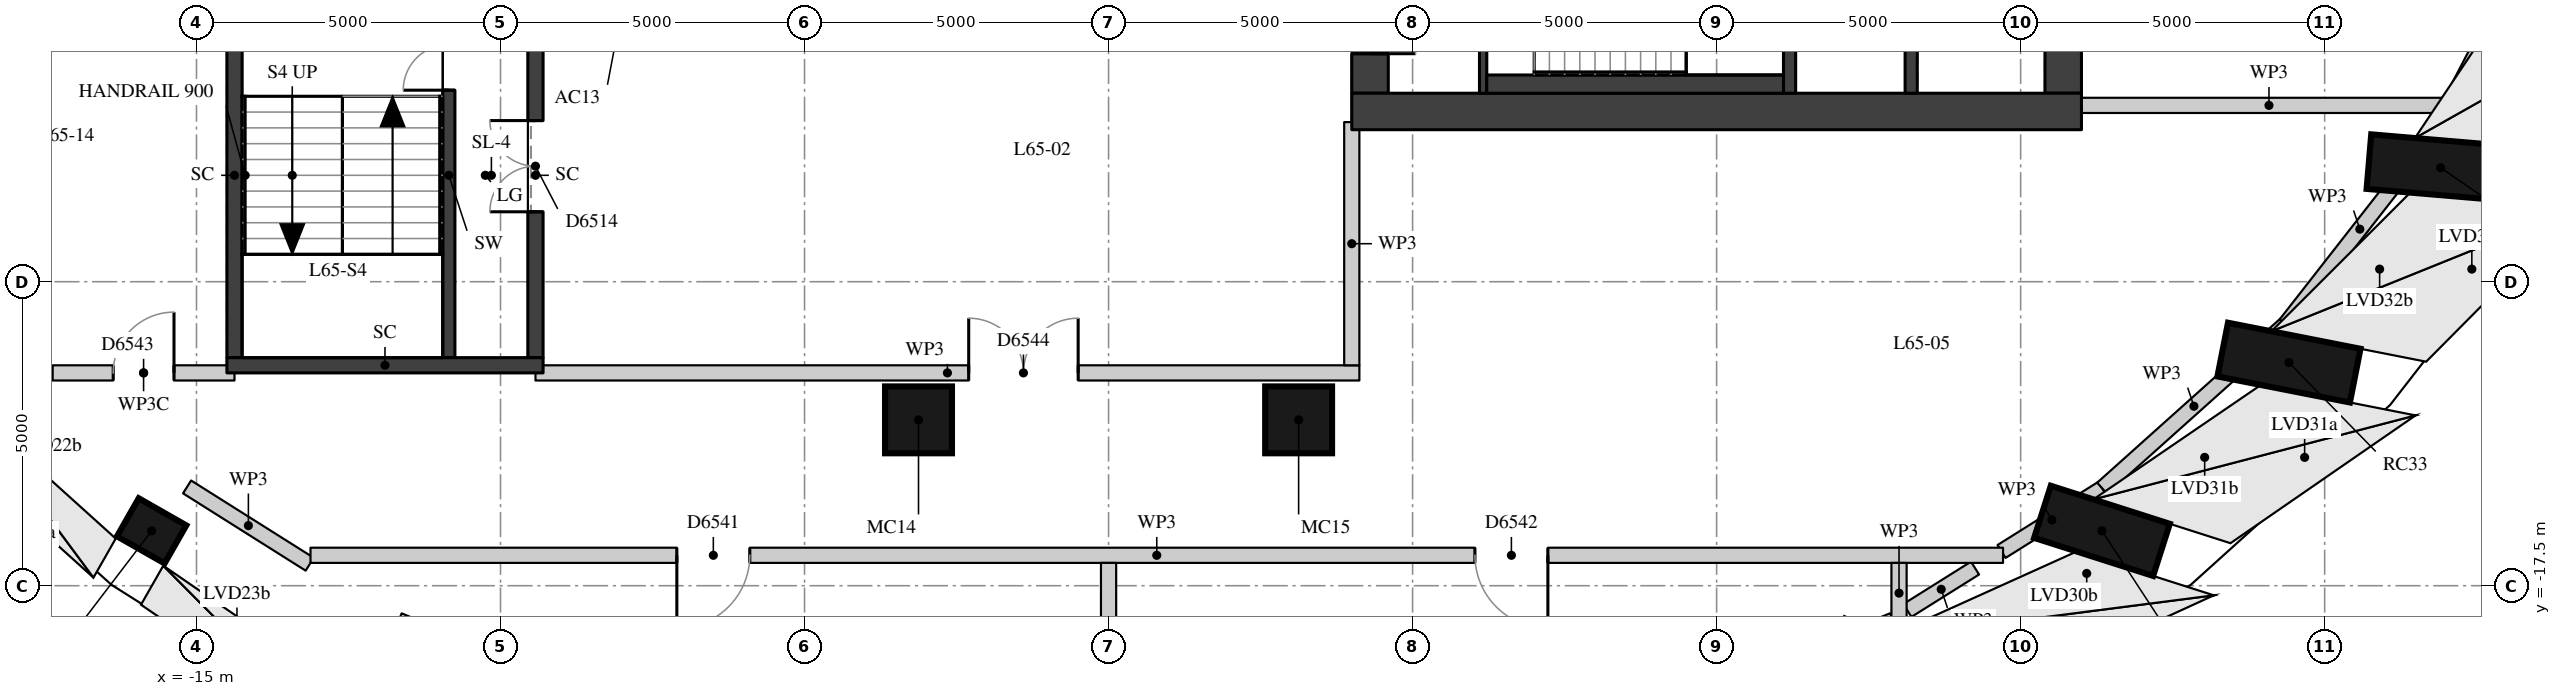
"""IFC4 building model, lengths in metres.
Left out: names, types, materials, properties, quantities, classifications, styles, units other than length and angle.
Written with IfcOpenShell. Run it as: python <this file> out.ifc"""

import sys

from ifc_helpers import new_model, si_unit, direction, frame, frame_2d, origin, origin_2d, place, context, subcontext, project, spatial, rectangle, extrude, element, fill, save


model = new_model("IFC4")
c1 = context("Model", 3, precision=1e-05, world=origin(), true_north=direction((0.0, 1.0)))
c2 = subcontext(c1, "Body", "Model", "MODEL_VIEW")
j1 = project(units=[si_unit("LENGTHUNIT", "METRE"), si_unit("PLANEANGLEUNIT", "RADIAN")], contexts=[c1])
p1 = place(None, origin())
s1 = spatial("IfcSite", under=j1, at=p1, CompositionType="ELEMENT")
p2 = place(p1, origin())
s2 = spatial("IfcBuilding", under=s1, at=p2, CompositionType="ELEMENT")
p3 = place(p2, frame((0.0, 0.0, 228.8)))
s3 = spatial("IfcBuildingStorey", under=s2, at=p3, CompositionType="ELEMENT", Elevation=228.8)
p4 = place(p3, frame((-15.916, -16.911, 0.125), z_axis=(0.082817185967, 0.145184984702, 0.985932367825), x_axis=(-0.488511582154, -0.856398895391, 0.167144745877)))
e1 = element("IfcColumn", 1, at=p4, inside=s3, PredefinedType="COLUMN", context=c2, shape_type="SweptSolid", body=[
    extrude(rectangle(XDim=1.5, YDim=0.9, at=origin_2d()), origin(), (0.0, 0.0, 1.0), 4.31),
])
p5 = place(p3, frame((-12.225, -19.235, 0.138), z_axis=(0.023293438415, 0.182825084924, 0.982869474574), x_axis=(-0.124221578206, -0.974987899185, 0.184303000384)))
e2 = element("IfcColumn", 2, at=p5, inside=s3, PredefinedType="COLUMN", context=c2, shape_type="SweptSolid", body=[
    extrude(rectangle(XDim=1.5, YDim=0.9, at=origin_2d()), origin(), (0.0, 0.0, 1.0), 4.297),
])
p6 = place(p3, frame((13.625, -19.235, 0.329), z_axis=(-0.39766730526, 0.183784775, 0.898934853482), x_axis=(0.816004150507, -0.377122124994, 0.438082331526)))
e3 = element("IfcColumn", 3, at=p6, inside=s3, PredefinedType="COLUMN", context=c2, shape_type="SweptSolid", body=[
    extrude(rectangle(XDim=1.5, YDim=0.9, at=origin_2d()), origin(), (0.0, 0.0, 1.0), 4.275),
])
p7 = place(p3, frame((17.316, -16.911, 0.358), z_axis=(-0.454490695447, 0.145316822908, 0.878818086257), x_axis=(0.837071803871, -0.267641595973, 0.477156967117)))
e4 = element("IfcColumn", 4, at=p7, inside=s3, PredefinedType="COLUMN", context=c2, shape_type="SweptSolid", body=[
    extrude(rectangle(XDim=1.5, YDim=0.9, at=origin_2d()), origin(), (0.0, 0.0, 1.0), 4.306),
])
p8 = place(p3, frame((20.502, -14.045, 0.383), z_axis=(-0.50159179073, 0.098643387801, 0.859462132682), x_axis=(0.843309160891, -0.165845761695, 0.511199415576)))
e5 = element("IfcColumn", 5, at=p8, inside=s3, PredefinedType="COLUMN", context=c2, shape_type="SweptSolid", body=[
    extrude(rectangle(XDim=1.5, YDim=0.9, at=origin_2d()), origin(), (0.0, 0.0, 1.0), 4.344),
])
p9 = place(p3, frame((23.087, -10.725, 0.405), z_axis=(-0.538018751555, 0.045665601519, 0.841695001656), x_axis=(0.838679431341, -0.07118488083, 0.539953261113)))
e6 = element("IfcColumn", 6, at=p9, inside=s3, PredefinedType="COLUMN", context=c2, shape_type="SweptSolid", body=[
    extrude(rectangle(XDim=1.5, YDim=0.9, at=origin_2d()), origin(), (0.0, 0.0, 1.0), 4.384),
])
for number, where, z_axis, x_axis in (
    (7, (-3.126, -14.772, 0.0), (0.0, 0.0, 1.0), (1.0, 0.0, 0.0)),
    (8, (3.126, -14.772, 0.0), (0.0, 0.0, 1.0), (1.0, 0.0, 0.0)),
):
    element("IfcColumn", number, at=place(p3, frame(where, z_axis=z_axis, x_axis=x_axis)), inside=s3, PredefinedType="COLUMN", context=c2, shape_type="SweptSolid", body=[
        extrude(rectangle(XDim=1.1, YDim=1.1, at=origin_2d()), origin(), (0.0, 0.0, 1.0), 4.5),
    ])
p10 = place(p3, frame((4.3, -9.4, 0.0), z_axis=(0.0, 0.0, 1.0), x_axis=(0.0, 1.0, 0.0)))
e9 = element("IfcWall", 9, at=p10, inside=s3, PredefinedType="SHEAR", context=c2, shape_type="SweptSolid", body=[
    extrude(rectangle(XDim=18.8, YDim=0.6, at=frame_2d((9.4, 0.0))), origin(), (0.0, 0.0, 1.0), 4.22),
])
p11 = place(p10, frame((0.65, 0.0, 0.0)))
e10 = element("IfcOpeningElement", 10, at=p11, cuts=e9, PredefinedType="OPENING", context=c2, shape_type="SweptSolid", body=[
    extrude(rectangle(XDim=1.5, YDim=2.1, at=frame_2d((0.75, 1.05))), frame((0.0, 0.31, 0.0), z_axis=(0.0, -1.0, 0.0), x_axis=(1.0, 0.0, 0.0)), (0.0, 0.0, 1.0), 0.62),
])
p12 = place(p10, frame((3.75, 0.0, 0.0)))
e11 = element("IfcOpeningElement", 11, at=p12, cuts=e9, PredefinedType="OPENING", context=c2, shape_type="SweptSolid", body=[
    extrude(rectangle(XDim=1.8, YDim=2.1, at=frame_2d((0.9, 1.05))), frame((0.0, 0.31, 0.0), z_axis=(0.0, -1.0, 0.0), x_axis=(1.0, 0.0, 0.0)), (0.0, 0.0, 1.0), 0.62),
])
p13 = place(p10, frame((6.25, 0.0, 0.0)))
e12 = element("IfcOpeningElement", 12, at=p13, cuts=e9, PredefinedType="OPENING", context=c2, shape_type="SweptSolid", body=[
    extrude(rectangle(XDim=1.1, YDim=2.1, at=frame_2d((0.55, 1.05))), frame((0.0, 0.31, 0.0), z_axis=(0.0, -1.0, 0.0), x_axis=(1.0, 0.0, 0.0)), (0.0, 0.0, 1.0), 0.62),
])
p14 = place(p10, frame((8.9, 0.0, 0.0)))
e13 = element("IfcOpeningElement", 13, at=p14, cuts=e9, PredefinedType="OPENING", context=c2, shape_type="SweptSolid", body=[
    extrude(rectangle(XDim=1.0, YDim=2.1, at=frame_2d((0.5, 1.05))), frame((0.0, 0.31, 0.0), z_axis=(0.0, -1.0, 0.0), x_axis=(1.0, 0.0, 0.0)), (0.0, 0.0, 1.0), 0.62),
])
p15 = place(p10, frame((11.45, 0.0, 0.0)))
e14 = element("IfcOpeningElement", 14, at=p15, cuts=e9, PredefinedType="OPENING", context=c2, shape_type="SweptSolid", body=[
    extrude(rectangle(XDim=1.1, YDim=2.1, at=frame_2d((0.55, 1.05))), frame((0.0, 0.31, 0.0), z_axis=(0.0, -1.0, 0.0), x_axis=(1.0, 0.0, 0.0)), (0.0, 0.0, 1.0), 0.62),
])
p16 = place(p10, frame((13.25, 0.0, 0.0)))
e15 = element("IfcOpeningElement", 15, at=p16, cuts=e9, PredefinedType="OPENING", context=c2, shape_type="SweptSolid", body=[
    extrude(rectangle(XDim=1.8, YDim=2.1, at=frame_2d((0.9, 1.05))), frame((0.0, 0.31, 0.0), z_axis=(0.0, -1.0, 0.0), x_axis=(1.0, 0.0, 0.0)), (0.0, 0.0, 1.0), 0.62),
])
p17 = place(p10, frame((16.65, 0.0, 0.0)))
e16 = element("IfcOpeningElement", 16, at=p17, cuts=e9, PredefinedType="OPENING", context=c2, shape_type="SweptSolid", body=[
    extrude(rectangle(XDim=1.5, YDim=2.1, at=frame_2d((0.75, 1.05))), frame((0.0, 0.31, 0.0), z_axis=(0.0, -1.0, 0.0), x_axis=(1.0, 0.0, 0.0)), (0.0, 0.0, 1.0), 0.62),
])
p18 = place(p3, frame((15.7, -9.4, 0.0), z_axis=(0.0, 0.0, 1.0), x_axis=(0.0, 1.0, 0.0)))
e17 = element("IfcWall", 17, at=p18, inside=s3, PredefinedType="SHEAR", context=c2, shape_type="SweptSolid", body=[
    extrude(rectangle(XDim=18.8, YDim=0.6, at=frame_2d((9.4, 0.0))), origin(), (0.0, 0.0, 1.0), 4.22),
])
p19 = place(p3, frame((4.0, -9.7, 0.0), z_axis=(0.0, 0.0, 1.0), x_axis=(1.0, 0.0, 0.0)))
e18 = element("IfcWall", 18, at=p19, inside=s3, PredefinedType="SHEAR", context=c2, shape_type="SweptSolid", body=[
    extrude(rectangle(XDim=12.0, YDim=0.6, at=frame_2d((6.0, 0.0))), origin(), (0.0, 0.0, 1.0), 4.22),
])
for number, where, z_axis, x_axis in (
    (19, (11.2, -9.4, 0.0), (0.0, 0.0, 1.0), (0.0, 1.0, 0.0)),
    (20, (13.2, -9.4, 0.0), (0.0, 0.0, 1.0), (0.0, 1.0, 0.0)),
):
    element("IfcWall", number, at=place(p3, frame(where, z_axis=z_axis, x_axis=x_axis)), inside=s3, PredefinedType="SHEAR", context=c2, shape_type="SweptSolid", body=[
        extrude(rectangle(XDim=3.5, YDim=0.2, at=frame_2d((1.75, 0.0))), origin(), (0.0, 0.0, 1.0), 4.22),
    ])
p20 = place(p3, frame((6.16, -9.4, 0.0), z_axis=(0.0, 0.0, 1.0), x_axis=(0.0, 1.0, 0.0)))
e21 = element("IfcWall", 21, at=p20, inside=s3, PredefinedType="SHEAR", context=c2, shape_type="SweptSolid", body=[
    extrude(rectangle(XDim=3.5, YDim=0.12, at=frame_2d((1.75, 0.0))), origin(), (0.0, 0.0, 1.0), 4.22),
])
p21 = place(p20, frame((1.15, 0.0, 0.0)))
e22 = element("IfcOpeningElement", 22, at=p21, cuts=e21, PredefinedType="OPENING", context=c2, shape_type="SweptSolid", body=[
    extrude(rectangle(XDim=1.5, YDim=2.1, at=frame_2d((0.75, 1.05))), frame((0.0, 0.07, 0.0), z_axis=(0.0, -1.0, 0.0), x_axis=(1.0, 0.0, 0.0)), (0.0, 0.0, 1.0), 0.14),
])
p22 = place(p3, frame((-10.85, -13.75, 0.0), z_axis=(0.0, 0.0, 1.0), x_axis=(0.0, 1.0, 0.0)))
e23 = element("IfcWall", 23, at=p22, inside=s3, PredefinedType="SHEAR", context=c2, shape_type="SweptSolid", body=[
    extrude(rectangle(XDim=6.0, YDim=0.2, at=frame_2d((3.0, 0.0))), origin(), (0.0, 0.0, 1.0), 4.22),
])
p23 = place(p22, frame((4.4, 0.0, 0.0)))
e24 = element("IfcOpeningElement", 24, at=p23, cuts=e23, PredefinedType="OPENING", context=c2, shape_type="SweptSolid", body=[
    extrude(rectangle(XDim=1.5, YDim=2.1, at=frame_2d((0.75, 1.05))), frame((0.0, 0.11, 0.0), z_axis=(0.0, -1.0, 0.0), x_axis=(1.0, 0.0, 0.0)), (0.0, 0.0, 1.0), 0.22),
])
p24 = place(p3, frame((6.22, -9.25, 0.0), z_axis=(0.0, 0.0, 1.0), x_axis=(1.0, 0.0, 0.0)))
e25 = element("IfcWall", 25, at=p24, inside=s3, PredefinedType="PARTITIONING", context=c2, shape_type="SweptSolid", body=[
    extrude(rectangle(XDim=4.88, YDim=0.3, at=frame_2d((2.44, 0.0))), origin(), (0.0, 0.0, 1.0), 4.22),
])
p25 = place(p3, frame((-14.375, -13.75, -0.45), z_axis=(0.0, 0.0, 1.0), x_axis=(0.0, 1.0, 0.0)))
e26 = element("IfcWall", 26, at=p25, inside=s3, PredefinedType="SHEAR", context=c2, shape_type="SweptSolid", body=[
    extrude(rectangle(XDim=6.0, YDim=0.25, at=frame_2d((3.0, 0.0))), origin(), (0.0, 0.0, 1.0), 4.67),
])
p26 = place(p3, frame((-9.425, -13.75, -0.45), z_axis=(0.0, 0.0, 1.0), x_axis=(0.0, 1.0, 0.0)))
e27 = element("IfcWall", 27, at=p26, inside=s3, PredefinedType="SHEAR", context=c2, shape_type="SweptSolid", body=[
    extrude(rectangle(XDim=6.0, YDim=0.25, at=frame_2d((3.0, 0.0))), origin(), (0.0, 0.0, 1.0), 4.67),
])
p27 = place(p26, frame((2.4, 0.0, 0.45)))
e28 = element("IfcOpeningElement", 28, at=p27, cuts=e27, PredefinedType="OPENING", context=c2, shape_type="SweptSolid", body=[
    extrude(rectangle(XDim=1.5, YDim=2.1, at=frame_2d((0.75, 1.05))), frame((0.0, 0.135, 0.0), z_axis=(0.0, -1.0, 0.0), x_axis=(1.0, 0.0, 0.0)), (0.0, 0.0, 1.0), 0.27),
])
p28 = place(p3, frame((-14.5, -13.875, -0.45), z_axis=(0.0, 0.0, 1.0), x_axis=(1.0, 0.0, 0.0)))
e29 = element("IfcWall", 29, at=p28, inside=s3, PredefinedType="SHEAR", context=c2, shape_type="SweptSolid", body=[
    extrude(rectangle(XDim=5.2, YDim=0.25, at=frame_2d((2.6, 0.0))), origin(), (0.0, 0.0, 1.0), 4.67),
])
p29 = place(p3, frame((-15.155, -15.875, 0.0), z_axis=(0.0, 0.0, 1.0), x_axis=(0.845943681367, -0.533272245627, 0.0)))
e30 = element("IfcWall", 30, at=p29, inside=s3, PredefinedType="PARTITIONING", context=c2, shape_type="SweptSolid", body=[
    extrude(rectangle(XDim=2.384, YDim=0.25, at=frame_2d((1.192, 0.0))), origin(), (0.0, 0.0, 1.0), 4.22),
])
p30 = place(p3, frame((14.686, -16.937, 0.0), z_axis=(0.0, 0.0, 1.0), x_axis=(0.847218267391, 0.53124495988, 0.0)))
e31 = element("IfcWall", 31, at=p30, inside=s3, PredefinedType="PARTITIONING", context=c2, shape_type="SweptSolid", body=[
    extrude(rectangle(XDim=1.954, YDim=0.25, at=frame_2d((0.977, 0.0))), origin(), (0.0, 0.0, 1.0), 4.22),
])
p31 = place(p3, frame((16.342, -15.899, 0.0), z_axis=(0.0, 0.0, 1.0), x_axis=(0.744902138238, 0.667173743824, 0.0)))
e32 = element("IfcWall", 32, at=p31, inside=s3, PredefinedType="PARTITIONING", context=c2, shape_type="SweptSolid", body=[
    extrude(rectangle(XDim=4.049, YDim=0.25, at=frame_2d((2.024, 0.0))), origin(), (0.0, 0.0, 1.0), 4.22),
])
p32 = place(p3, frame((19.358, -13.198, 0.0), z_axis=(0.0, 0.0, 1.0), x_axis=(0.615665549252, 0.78800757069, 0.0)))
e33 = element("IfcWall", 33, at=p32, inside=s3, PredefinedType="PARTITIONING", context=c2, shape_type="SweptSolid", body=[
    extrude(rectangle(XDim=3.965, YDim=0.25, at=frame_2d((1.982, 0.0))), origin(), (0.0, 0.0, 1.0), 4.22),
])
p33 = place(p3, frame((22.102, -9.491, 0.0), z_axis=(0.0, 0.0, 1.0), x_axis=(0.462075514026, 0.886840582821, 0.0)))
e34 = element("IfcWall", 34, at=p33, inside=s3, PredefinedType="PARTITIONING", context=c2, shape_type="SweptSolid", body=[
    extrude(rectangle(XDim=3.232, YDim=0.25, at=frame_2d((1.616, 0.0))), origin(), (0.0, 0.0, 1.0), 4.22),
])
p34 = place(p3, frame((-11.674, -18.07, 0.0), z_axis=(0.0, 0.0, 1.0), x_axis=(0.921899654527, -0.387428737942, 0.0)))
e35 = element("IfcWall", 35, at=p34, inside=s3, PredefinedType="PARTITIONING", context=c2, shape_type="SweptSolid", body=[
    extrude(rectangle(XDim=4.188, YDim=0.25, at=frame_2d((2.094, 0.0))), origin(), (0.0, 0.0, 1.0), 4.22),
])
p35 = place(p3, frame((8.964, -19.711, 0.0), z_axis=(0.0, 0.0, 1.0), x_axis=(0.922871881565, 0.38510711525, 0.0)))
e36 = element("IfcWall", 36, at=p35, inside=s3, PredefinedType="PARTITIONING", context=c2, shape_type="SweptSolid", body=[
    extrude(rectangle(XDim=4.265, YDim=0.25, at=frame_2d((2.133, 0.0))), origin(), (0.0, 0.0, 1.0), 4.22),
])
p36 = place(p3, frame((13.138, -17.907, 0.0), z_axis=(0.0, 0.0, 1.0), x_axis=(0.84728708842, 0.531135189756, 0.0)))
e37 = element("IfcWall", 37, at=p36, inside=s3, PredefinedType="PARTITIONING", context=c2, shape_type="SweptSolid", body=[
    extrude(rectangle(XDim=1.313, YDim=0.25, at=frame_2d((0.656, 0.0))), origin(), (0.0, 0.0, 1.0), 4.22),
])
p37 = place(p3, frame((-13.125, -17.0, 0.0), z_axis=(0.0, 0.0, 1.0), x_axis=(1.0, 0.0, 0.0)))
e38 = element("IfcWall", 38, at=p37, inside=s3, PredefinedType="PARTITIONING", context=c2, shape_type="SweptSolid", body=[
    extrude(rectangle(XDim=27.835, YDim=0.25, at=frame_2d((13.918, 0.0))), origin(), (0.0, 0.0, 1.0), 4.22),
])
p38 = place(p37, frame((6.025, 0.0, 0.0)))
e39 = element("IfcOpeningElement", 39, at=p38, cuts=e38, PredefinedType="OPENING", context=c2, shape_type="SweptSolid", body=[
    extrude(rectangle(XDim=1.2, YDim=2.1, at=frame_2d((0.6, 1.05))), frame((0.0, 0.135, 0.0), z_axis=(0.0, -1.0, 0.0), x_axis=(1.0, 0.0, 0.0)), (0.0, 0.0, 1.0), 0.27),
])
p39 = place(p37, frame((19.15, 0.0, 0.0)))
e40 = element("IfcOpeningElement", 40, at=p39, cuts=e38, PredefinedType="OPENING", context=c2, shape_type="SweptSolid", body=[
    extrude(rectangle(XDim=1.2, YDim=2.1, at=frame_2d((0.6, 1.05))), frame((0.0, 0.135, 0.0), z_axis=(0.0, -1.0, 0.0), x_axis=(1.0, 0.0, 0.0)), (0.0, 0.0, 1.0), 0.27),
])
p40 = place(p3, frame((-17.365, -14.0, 0.0), z_axis=(0.0, 0.0, 1.0), x_axis=(1.0, 0.0, 0.0)))
e41 = element("IfcWall", 41, at=p40, inside=s3, PredefinedType="PARTITIONING", context=c2, shape_type="SweptSolid", body=[
    extrude(rectangle(XDim=2.99, YDim=0.25, at=frame_2d((1.495, 0.0))), origin(), (0.0, 0.0, 1.0), 3.77),
])
p41 = place(p40, frame((0.995, 0.0, 0.0)))
e42 = element("IfcOpeningElement", 42, at=p41, cuts=e41, PredefinedType="OPENING", context=c2, shape_type="SweptSolid", body=[
    extrude(rectangle(XDim=1.0, YDim=2.1, at=frame_2d((0.5, 1.05))), frame((0.0, 0.135, 0.0), z_axis=(0.0, -1.0, 0.0), x_axis=(1.0, 0.0, 0.0)), (0.0, 0.0, 1.0), 0.27),
])
p42 = place(p3, frame((-9.425, -14.0, 0.0), z_axis=(0.0, 0.0, 1.0), x_axis=(1.0, 0.0, 0.0)))
e43 = element("IfcWall", 43, at=p42, inside=s3, PredefinedType="PARTITIONING", context=c2, shape_type="SweptSolid", body=[
    extrude(rectangle(XDim=13.55, YDim=0.25, at=frame_2d((6.775, 0.0))), origin(), (0.0, 0.0, 1.0), 4.22),
])
p43 = place(p42, frame((7.125, 0.0, 0.0)))
e44 = element("IfcOpeningElement", 44, at=p43, cuts=e43, PredefinedType="OPENING", context=c2, shape_type="SweptSolid", body=[
    extrude(rectangle(XDim=1.8, YDim=2.1, at=frame_2d((0.9, 1.05))), frame((0.0, 0.135, 0.0), z_axis=(0.0, -1.0, 0.0), x_axis=(1.0, 0.0, 0.0)), (0.0, 0.0, 1.0), 0.27),
])
p44 = place(p3, frame((15.998, -9.6, 0.0), z_axis=(0.0, 0.0, 1.0), x_axis=(1.0, 0.0, 0.0)))
e45 = element("IfcWall", 45, at=p44, inside=s3, PredefinedType="PARTITIONING", context=c2, shape_type="SweptSolid", body=[
    extrude(rectangle(XDim=6.172, YDim=0.25, at=frame_2d((3.086, 0.0))), origin(), (0.0, 0.0, 1.0), 4.22),
])
p45 = place(p3, frame((0.0, -21.11, 0.0), z_axis=(0.0, 0.0, 1.0), x_axis=(0.0, 1.0, 0.0)))
e46 = element("IfcWall", 46, at=p45, inside=s3, PredefinedType="PARTITIONING", context=c2, shape_type="SweptSolid", body=[
    extrude(rectangle(XDim=3.985, YDim=0.25, at=frame_2d((1.993, 0.0))), origin(), (0.0, 0.0, 1.0), 3.77),
])
p46 = place(p3, frame((4.0, -13.875, 0.0), z_axis=(0.0, 0.0, 1.0), x_axis=(0.0, 1.0, 0.0)))
e47 = element("IfcWall", 47, at=p46, inside=s3, PredefinedType="PARTITIONING", context=c2, shape_type="SweptSolid", body=[
    extrude(rectangle(XDim=4.0, YDim=0.25, at=frame_2d((2.0, 0.0))), origin(), (0.0, 0.0, 1.0), 4.22),
])
p47 = place(p3, frame((13.0, -18.119, 0.0), z_axis=(0.0, 0.0, 1.0), x_axis=(0.0, 1.0, 0.0)))
e48 = element("IfcWall", 48, at=p47, inside=s3, PredefinedType="PARTITIONING", context=c2, shape_type="SweptSolid", body=[
    extrude(rectangle(XDim=0.994, YDim=0.25, at=frame_2d((0.497, 0.0))), origin(), (0.0, 0.0, 1.0), 4.22),
])
p48 = place(p11, origin())
e49 = element("IfcDoor", 49, at=p48, inside=s3, OperationType="DOUBLE_DOOR_SINGLE_SWING", PredefinedType="DOOR", context=c2, shape_type="SweptSolid", body=[
    extrude(rectangle(XDim=1.5, YDim=2.1, at=frame_2d((0.75, 1.05))), frame((0.0, 0.025, 0.0), z_axis=(0.0, -1.0, 0.0), x_axis=(1.0, 0.0, 0.0)), (0.0, 0.0, 1.0), 0.05),
])
fill(e10, e49)
p49 = place(p23, origin())
e50 = element("IfcDoor", 50, at=p49, inside=s3, OperationType="DOUBLE_DOOR_SINGLE_SWING", PredefinedType="DOOR", context=c2, shape_type="SweptSolid", body=[
    extrude(rectangle(XDim=1.5, YDim=2.1, at=frame_2d((0.75, 1.05))), frame((0.0, 0.025, 0.0), z_axis=(0.0, -1.0, 0.0), x_axis=(1.0, 0.0, 0.0)), (0.0, 0.0, 1.0), 0.05),
])
fill(e24, e50)
p50 = place(p27, origin())
e51 = element("IfcDoor", 51, at=p50, inside=s3, OperationType="DOUBLE_DOOR_SINGLE_SWING", PredefinedType="DOOR", context=c2, shape_type="SweptSolid", body=[
    extrude(rectangle(XDim=1.5, YDim=2.1, at=frame_2d((0.75, 1.05))), frame((0.0, 0.025, 0.0), z_axis=(0.0, -1.0, 0.0), x_axis=(1.0, 0.0, 0.0)), (0.0, 0.0, 1.0), 0.05),
])
fill(e28, e51)
p51 = place(p38, origin())
e52 = element("IfcDoor", 52, at=p51, inside=s3, OperationType="SINGLE_SWING_RIGHT", PredefinedType="DOOR", context=c2, shape_type="SweptSolid", body=[
    extrude(rectangle(XDim=1.2, YDim=2.1, at=frame_2d((0.6, 1.05))), frame((0.0, 0.025, 0.0), z_axis=(0.0, -1.0, 0.0), x_axis=(1.0, 0.0, 0.0)), (0.0, 0.0, 1.0), 0.05),
])
fill(e39, e52)
p52 = place(p39, origin())
e53 = element("IfcDoor", 53, at=p52, inside=s3, OperationType="SINGLE_SWING_LEFT", PredefinedType="DOOR", context=c2, shape_type="SweptSolid", body=[
    extrude(rectangle(XDim=1.2, YDim=2.1, at=frame_2d((0.6, 1.05))), frame((0.0, 0.025, 0.0), z_axis=(0.0, -1.0, 0.0), x_axis=(1.0, 0.0, 0.0)), (0.0, 0.0, 1.0), 0.05),
])
fill(e40, e53)
p53 = place(p43, origin())
e54 = element("IfcDoor", 54, at=p53, inside=s3, OperationType="DOUBLE_DOOR_SINGLE_SWING", PredefinedType="DOOR", context=c2, shape_type="SweptSolid", body=[
    extrude(rectangle(XDim=1.8, YDim=2.1, at=frame_2d((0.9, 1.05))), frame((0.0, 0.025, 0.0), z_axis=(0.0, -1.0, 0.0), x_axis=(1.0, 0.0, 0.0)), (0.0, 0.0, 1.0), 0.05),
])
fill(e44, e54)
p54 = place(p41, origin())
e55 = element("IfcDoor", 55, at=p54, inside=s3, OperationType="SINGLE_SWING_RIGHT", PredefinedType="DOOR", context=c2, shape_type="SweptSolid", body=[
    extrude(rectangle(XDim=1.0, YDim=2.1, at=frame_2d((0.5, 1.05))), frame((0.0, 0.025, 0.0), z_axis=(0.0, -1.0, 0.0), x_axis=(1.0, 0.0, 0.0)), (0.0, 0.0, 1.0), 0.05),
])
fill(e42, e55)
save(model, sys.argv[1])
